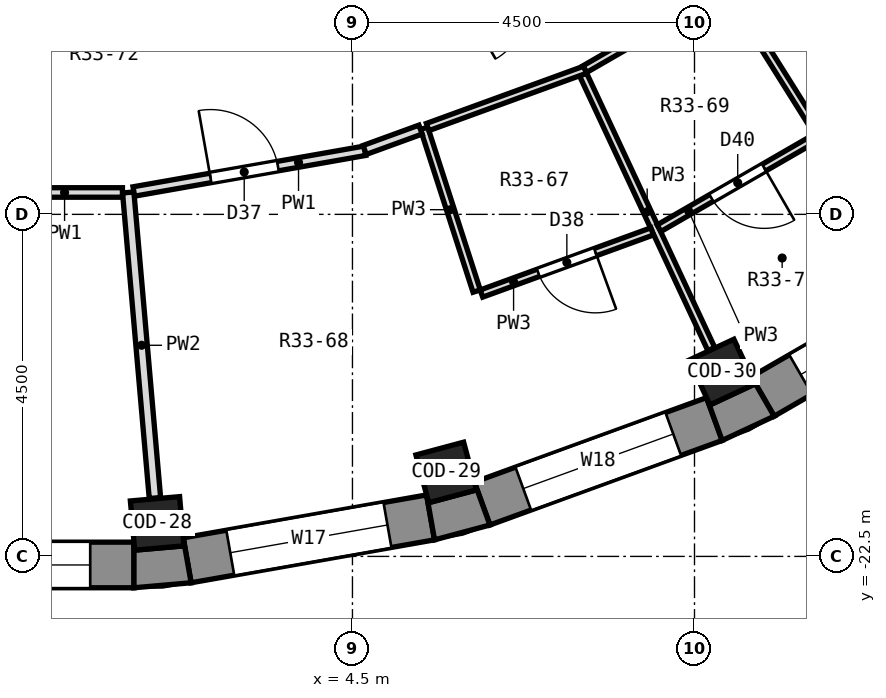
"""IFC4 building model, lengths in metres.
Left out: names, types, materials, properties, quantities, classifications, styles, units other than length and angle.
Written with IfcOpenShell. Run it as: python <this file> out.ifc"""

import sys

from ifc_helpers import new_model, si_unit, direction, frame, frame_2d, origin, origin_2d, place, context, subcontext, project, spatial, polyline, rectangle, outline, extrude, element, fill, save


model = new_model("IFC4")
c1 = context("Model", 3, precision=1e-05, world=origin(), true_north=direction((0.0, 1.0)))
c2 = subcontext(c1, "Body", "Model", "MODEL_VIEW")
j1 = project(units=[si_unit("LENGTHUNIT", "METRE"), si_unit("PLANEANGLEUNIT", "RADIAN")], contexts=[c1])
p1 = place(None, origin())
s1 = spatial("IfcSite", under=j1, at=p1, CompositionType="ELEMENT")
p2 = place(p1, origin())
s2 = spatial("IfcBuilding", under=s1, at=p2, CompositionType="ELEMENT")
p3 = place(p2, frame((0.0, 0.0, 229.7)))
s3 = spatial("IfcBuildingStorey", under=s2, at=p3, CompositionType="ELEMENT", Elevation=229.7)
for number, where, z_axis, x_axis in (
    (1, (1.93, -22.066, 0.0), (0.0, 0.0, 1.0), (0.087, -0.996, 0.0)),
    (2, (5.733, -21.395, 0.0), (0.0, 0.0, 1.0), (0.259, -0.966, 0.0)),
    (3, (9.361, -20.075, 0.0), (0.0, 0.0, 1.0), (0.423, -0.906, 0.0)),
):
    element("IfcColumn", number, at=place(p3, frame(where, z_axis=z_axis, x_axis=x_axis)), inside=s3, PredefinedType="COLUMN", context=c2, shape_type="SweptSolid", body=[
        extrude(rectangle(XDim=0.65, YDim=0.65, at=origin_2d()), origin(), (0.0, 0.0, 1.0), 3.3),
    ])
p4 = place(p3, frame((-1.626, -22.613, 0.0), z_axis=(0.0, 0.0, 1.0), x_axis=(1.0, 0.0, 0.0)))
e4 = element("IfcWall", 4, at=p4, inside=s3, PredefinedType="SOLIDWALL", context=c2, shape_type="SweptSolid", body=[
    extrude(rectangle(XDim=3.251, YDim=0.6, at=frame_2d((1.626, 0.0))), origin(), (0.0, 0.0, 1.0), 2.9),
])
p5 = place(p4, frame((0.576, 0.0, 0.9)))
e5 = element("IfcOpeningElement", 5, at=p5, cuts=e4, PredefinedType="OPENING", context=c2, shape_type="SweptSolid", body=[
    extrude(rectangle(XDim=2.1, YDim=1.8, at=frame_2d((1.05, 0.9))), frame((0.0, 0.312, 0.0), z_axis=(0.0, -1.0, 0.0), x_axis=(1.0, 0.0, 0.0)), (0.0, 0.0, 1.0), 0.624),
])
p6 = place(p3, frame((2.325, -22.551, 0.0), z_axis=(0.0, 0.0, 1.0), x_axis=(0.984806225186, 0.173656842178, 0.0)))
e6 = element("IfcWall", 6, at=p6, inside=s3, PredefinedType="SOLIDWALL", context=c2, shape_type="SweptSolid", body=[
    extrude(rectangle(XDim=3.252, YDim=0.6, at=frame_2d((1.626, 0.0))), origin(), (0.0, 0.0, 1.0), 2.9),
])
p7 = place(p6, frame((0.576, 0.0, 0.9)))
e7 = element("IfcOpeningElement", 7, at=p7, cuts=e6, PredefinedType="OPENING", context=c2, shape_type="SweptSolid", body=[
    extrude(rectangle(XDim=2.1, YDim=1.8, at=frame_2d((1.05, 0.9))), frame((0.0, 0.312, 0.0), z_axis=(0.0, -1.0, 0.0), x_axis=(1.0, 0.0, 0.0)), (0.0, 0.0, 1.0), 0.624),
])
p8 = place(p3, frame((6.206, -21.805, 0.0), z_axis=(0.0, 0.0, 1.0), x_axis=(0.939679383794, 0.342056509473, 0.0)))
e8 = element("IfcWall", 8, at=p8, inside=s3, PredefinedType="SOLIDWALL", context=c2, shape_type="SweptSolid", body=[
    extrude(rectangle(XDim=3.252, YDim=0.6, at=frame_2d((1.626, 0.0))), origin(), (0.0, 0.0, 1.0), 2.9),
])
p9 = place(p8, frame((0.576, 0.0, 0.9)))
e9 = element("IfcOpeningElement", 9, at=p9, cuts=e8, PredefinedType="OPENING", context=c2, shape_type="SweptSolid", body=[
    extrude(rectangle(XDim=2.1, YDim=1.8, at=frame_2d((1.05, 0.9))), frame((0.0, 0.312, 0.0), z_axis=(0.0, -1.0, 0.0), x_axis=(1.0, 0.0, 0.0)), (0.0, 0.0, 1.0), 0.624),
])
p10 = place(p3, frame((9.898, -20.396, 0.0), z_axis=(0.0, 0.0, 1.0), x_axis=(0.866016800201, 0.500014901547, 0.0)))
e10 = element("IfcWall", 10, at=p10, inside=s3, PredefinedType="SOLIDWALL", context=c2, shape_type="SweptSolid", body=[
    extrude(rectangle(XDim=3.252, YDim=0.6, at=frame_2d((1.626, 0.0))), origin(), (0.0, 0.0, 1.0), 2.9),
])
p11 = place(p10, frame((0.576, 0.0, 0.9)))
e11 = element("IfcOpeningElement", 11, at=p11, cuts=e10, PredefinedType="OPENING", context=c2, shape_type="SweptSolid", body=[
    extrude(rectangle(XDim=2.1, YDim=1.8, at=frame_2d((1.05, 0.9))), frame((0.0, 0.312, 0.0), z_axis=(0.0, -1.0, 0.0), x_axis=(1.0, 0.0, 0.0)), (0.0, 0.0, 1.0), 0.624),
])
p12 = place(p3, origin())
e12 = element("IfcWall", 12, at=p12, inside=s3, PredefinedType="SOLIDWALL", context=c2, shape_type="SweptSolid", body=[
    extrude(outline(polyline([(1.626, -22.913), (2.378, -22.847), (2.273, -22.256), (2.283, -22.361), (1.635, -22.418), (1.626, -22.312), (1.626, -22.913)])), origin(), (0.0, 0.0, 1.0), 2.9),
])
p13 = place(p3, origin())
e13 = element("IfcWall", 13, at=p13, inside=s3, PredefinedType="SOLIDWALL", context=c2, shape_type="SweptSolid", body=[
    extrude(outline(polyline([(6.309, -22.087), (6.104, -21.523), (6.131, -21.625), (5.503, -21.793), (5.476, -21.691), (5.58, -22.282), (6.309, -22.087)])), origin(), (0.0, 0.0, 1.0), 2.9),
])
p14 = place(p3, origin())
e14 = element("IfcWall", 14, at=p14, inside=s3, PredefinedType="SOLIDWALL", context=c2, shape_type="SweptSolid", body=[
    extrude(outline(polyline([(9.364, -20.975), (10.048, -20.656), (9.748, -20.136), (9.793, -20.232), (9.204, -20.507), (9.159, -20.411), (9.364, -20.975)])), origin(), (0.0, 0.0, 1.0), 2.9),
])
p15 = place(p3, frame((1.55, -17.712, 0.0), z_axis=(0.0, 0.0, 1.0), x_axis=(0.087120418717, -0.996197787913, 0.0)))
e15 = element("IfcWall", 15, at=p15, inside=s3, PredefinedType="PARTITIONING", context=c2, shape_type="SweptSolid", body=[
    extrude(rectangle(XDim=4.035, YDim=0.15, at=frame_2d((2.018, 0.0))), origin(), (0.0, 0.0, 1.0), 2.9),
])
p16 = place(p3, frame((5.443, -16.868, 0.0), z_axis=(0.0, 0.0, 1.0), x_axis=(0.307034478859, -0.951698391714, 0.0)))
e16 = element("IfcWall", 16, at=p16, inside=s3, PredefinedType="PARTITIONING", context=c2, shape_type="SweptSolid", body=[
    extrude(rectangle(XDim=2.25, YDim=0.1, at=frame_2d((1.125, 0.0))), origin(), (0.0, 0.0, 1.0), 2.9),
])
p17 = place(p3, frame((7.534, -16.16, 0.0), z_axis=(0.0, 0.0, 1.0), x_axis=(0.423136981181, -0.90606572342, 0.0)))
e17 = element("IfcWall", 17, at=p17, inside=s3, PredefinedType="PARTITIONING", context=c2, shape_type="SweptSolid", body=[
    extrude(rectangle(XDim=3.985, YDim=0.1, at=frame_2d((1.993, 0.0))), origin(), (0.0, 0.0, 1.0), 2.9),
])
p18 = place(p3, frame((9.423, -15.012, 0.0), z_axis=(0.0, 0.0, 1.0), x_axis=(0.531608930636, -0.846989931975, 0.0)))
e18 = element("IfcWall", 18, at=p18, inside=s3, PredefinedType="PARTITIONING", context=c2, shape_type="SweptSolid", body=[
    extrude(rectangle(XDim=2.302, YDim=0.1, at=frame_2d((1.151, 0.0))), origin(), (0.0, 0.0, 1.0), 2.9),
])
p19 = place(p3, frame((10.225, -14.607, 0.0), z_axis=(0.0, 0.0, 1.0), x_axis=(0.573696694948, -0.819067825156, 0.0)))
e19 = element("IfcWall", 19, at=p19, inside=s3, PredefinedType="PARTITIONING", context=c2, shape_type="SweptSolid", body=[
    extrude(rectangle(XDim=3.985, YDim=0.125, at=frame_2d((1.992, 0.0))), origin(), (0.0, 0.0, 1.0), 2.9),
])
p20 = place(p19, frame((2.309, 0.0, 0.0)))
e20 = element("IfcOpeningElement", 20, at=p20, cuts=e19, PredefinedType="OPENING", context=c2, shape_type="SweptSolid", body=[
    extrude(rectangle(XDim=0.9, YDim=2.1, at=frame_2d((0.45, 1.05))), frame((0.0, 0.074, 0.0), z_axis=(0.0, -1.0, 0.0), x_axis=(1.0, 0.0, 0.0)), (0.0, 0.0, 1.0), 0.149),
])
p21 = place(p3, frame((-1.488, -17.712, 0.0), z_axis=(0.0, 0.0, 1.0), x_axis=(1.0, 0.0, 0.0)))
e21 = element("IfcWall", 21, at=p21, inside=s3, PredefinedType="PARTITIONING", context=c2, shape_type="SweptSolid", body=[
    extrude(rectangle(XDim=2.962, YDim=0.125, at=frame_2d((1.481, 0.0))), origin(), (0.0, 0.0, 1.0), 2.9),
])
p22 = place(p21, frame((1.037, 0.0, 0.0)))
e22 = element("IfcOpeningElement", 22, at=p22, cuts=e21, PredefinedType="OPENING", context=c2, shape_type="SweptSolid", body=[
    extrude(rectangle(XDim=0.9, YDim=2.1, at=frame_2d((0.45, 1.05))), frame((0.0, 0.074, 0.0), z_axis=(0.0, -1.0, 0.0), x_axis=(1.0, 0.0, 0.0)), (0.0, 0.0, 1.0), 0.149),
])
p23 = place(p3, frame((1.624, -17.699, 0.0), z_axis=(0.0, 0.0, 1.0), x_axis=(0.98485035276, 0.17340640896, 0.0)))
e23 = element("IfcWall", 23, at=p23, inside=s3, PredefinedType="PARTITIONING", context=c2, shape_type="SweptSolid", body=[
    extrude(rectangle(XDim=3.088, YDim=0.125, at=frame_2d((1.544, 0.0))), origin(), (0.0, 0.0, 1.0), 2.9),
])
p24 = place(p23, frame((1.024, 0.0, 0.0)))
e24 = element("IfcOpeningElement", 24, at=p24, cuts=e23, PredefinedType="OPENING", context=c2, shape_type="SweptSolid", body=[
    extrude(rectangle(XDim=0.9, YDim=2.1, at=frame_2d((0.45, 1.05))), frame((0.0, 0.074, 0.0), z_axis=(0.0, -1.0, 0.0), x_axis=(1.0, 0.0, 0.0)), (0.0, 0.0, 1.0), 0.149),
])
p25 = place(p3, frame((6.197, -19.042, 0.0), z_axis=(0.0, 0.0, 1.0), x_axis=(0.939644231496, 0.342153062556, 0.0)))
e25 = element("IfcWall", 25, at=p25, inside=s3, PredefinedType="PARTITIONING", context=c2, shape_type="SweptSolid", body=[
    extrude(rectangle(XDim=2.39, YDim=0.1, at=frame_2d((1.195, 0.0))), origin(), (0.0, 0.0, 1.0), 2.9),
])
p26 = place(p25, frame((0.796, 0.0, 0.0)))
e26 = element("IfcOpeningElement", 26, at=p26, cuts=e25, PredefinedType="OPENING", context=c2, shape_type="SweptSolid", body=[
    extrude(rectangle(XDim=0.8, YDim=2.1, at=frame_2d((0.4, 1.05))), frame((0.0, 0.062, 0.0), z_axis=(0.0, -1.0, 0.0), x_axis=(1.0, 0.0, 0.0)), (0.0, 0.0, 1.0), 0.124),
])
p27 = place(p3, frame((5.49, -16.851, 0.0), z_axis=(0.0, 0.0, 1.0), x_axis=(0.939680214162, 0.342054228323, 0.0)))
e27 = element("IfcWall", 27, at=p27, inside=s3, PredefinedType="PARTITIONING", context=c2, shape_type="SweptSolid", body=[
    extrude(rectangle(XDim=2.205, YDim=0.1, at=frame_2d((1.103, 0.0))), origin(), (0.0, 0.0, 1.0), 2.9),
])
p28 = place(p3, frame((4.661, -17.153, 0.0), z_axis=(0.0, 0.0, 1.0), x_axis=(0.93962024549, 0.342218927391, 0.0)))
e28 = element("IfcWall", 28, at=p28, inside=s3, PredefinedType="PARTITIONING", context=c2, shape_type="SweptSolid", body=[
    extrude(rectangle(XDim=0.783, YDim=0.125, at=frame_2d((0.391, 0.0))), origin(), (0.0, 0.0, 1.0), 2.9),
])
p29 = place(p3, frame((8.533, -18.182, 0.0), z_axis=(0.0, 0.0, 1.0), x_axis=(0.866136275394, 0.49980791555, 0.0)))
e29 = element("IfcWall", 29, at=p29, inside=s3, PredefinedType="PARTITIONING", context=c2, shape_type="SweptSolid", body=[
    extrude(rectangle(XDim=2.391, YDim=0.1, at=frame_2d((1.195, 0.0))), origin(), (0.0, 0.0, 1.0), 2.9),
])
p30 = place(p29, frame((0.795, 0.0, 0.0)))
e30 = element("IfcOpeningElement", 30, at=p30, cuts=e29, PredefinedType="OPENING", context=c2, shape_type="SweptSolid", body=[
    extrude(rectangle(XDim=0.8, YDim=2.1, at=frame_2d((0.4, 1.05))), frame((0.0, 0.062, 0.0), z_axis=(0.0, -1.0, 0.0), x_axis=(1.0, 0.0, 0.0)), (0.0, 0.0, 1.0), 0.124),
])
p31 = place(p3, frame((7.557, -16.089, 0.0), z_axis=(0.0, 0.0, 1.0), x_axis=(0.866022320763, 0.500005339912, 0.0)))
e31 = element("IfcWall", 31, at=p31, inside=s3, PredefinedType="PARTITIONING", context=c2, shape_type="SweptSolid", body=[
    extrude(rectangle(XDim=2.092, YDim=0.1, at=frame_2d((1.046, 0.0))), origin(), (0.0, 0.0, 1.0), 2.9),
])
p32 = place(p5, origin())
e32 = element("IfcWindow", 32, at=p32, inside=s3, PartitioningType="SINGLE_PANEL", PredefinedType="WINDOW", context=c2, shape_type="SweptSolid", body=[
    extrude(rectangle(XDim=2.1, YDim=1.8, at=frame_2d((1.05, 0.9))), frame((0.0, 0.18, 0.0), z_axis=(0.0, -1.0, 0.0), x_axis=(1.0, 0.0, 0.0)), (0.0, 0.0, 1.0), 0.06),
])
fill(e5, e32)
p33 = place(p7, origin())
e33 = element("IfcWindow", 33, at=p33, inside=s3, PartitioningType="SINGLE_PANEL", PredefinedType="WINDOW", context=c2, shape_type="SweptSolid", body=[
    extrude(rectangle(XDim=2.1, YDim=1.8, at=frame_2d((1.05, 0.9))), frame((0.0, 0.18, 0.0), z_axis=(0.0, -1.0, 0.0), x_axis=(1.0, 0.0, 0.0)), (0.0, 0.0, 1.0), 0.06),
])
fill(e7, e33)
p34 = place(p9, origin())
e34 = element("IfcWindow", 34, at=p34, inside=s3, PartitioningType="SINGLE_PANEL", PredefinedType="WINDOW", context=c2, shape_type="SweptSolid", body=[
    extrude(rectangle(XDim=2.1, YDim=1.8, at=frame_2d((1.05, 0.9))), frame((0.0, 0.18, 0.0), z_axis=(0.0, -1.0, 0.0), x_axis=(1.0, 0.0, 0.0)), (0.0, 0.0, 1.0), 0.06),
])
fill(e9, e34)
p35 = place(p11, origin())
e35 = element("IfcWindow", 35, at=p35, inside=s3, PartitioningType="SINGLE_PANEL", PredefinedType="WINDOW", context=c2, shape_type="SweptSolid", body=[
    extrude(rectangle(XDim=2.1, YDim=1.8, at=frame_2d((1.05, 0.9))), frame((0.0, 0.18, 0.0), z_axis=(0.0, -1.0, 0.0), x_axis=(1.0, 0.0, 0.0)), (0.0, 0.0, 1.0), 0.06),
])
fill(e11, e35)
p36 = place(p24, origin())
e36 = element("IfcDoor", 36, at=p36, inside=s3, OperationType="SINGLE_SWING_LEFT", PredefinedType="DOOR", context=c2, shape_type="SweptSolid", body=[
    extrude(rectangle(XDim=0.9, YDim=2.1, at=frame_2d((0.45, 1.05))), frame((0.0, 0.025, 0.0), z_axis=(0.0, -1.0, 0.0), x_axis=(1.0, 0.0, 0.0)), (0.0, 0.0, 1.0), 0.05),
])
fill(e24, e36)
p37 = place(p26, frame((0.8, 0.0, 0.0), z_axis=(0.0, 0.0, 1.0), x_axis=(-1.0, 0.0, 0.0)))
e37 = element("IfcDoor", 37, at=p37, inside=s3, OperationType="SINGLE_SWING_LEFT", PredefinedType="DOOR", context=c2, shape_type="SweptSolid", body=[
    extrude(rectangle(XDim=0.8, YDim=2.1, at=frame_2d((0.4, 1.05))), frame((0.0, 0.025, 0.0), z_axis=(0.0, -1.0, 0.0), x_axis=(1.0, 0.0, 0.0)), (0.0, 0.0, 1.0), 0.05),
])
fill(e26, e37)
p38 = place(p30, frame((0.8, 0.0, 0.0), z_axis=(0.0, 0.0, 1.0), x_axis=(-1.0, 0.0, 0.0)))
e38 = element("IfcDoor", 38, at=p38, inside=s3, OperationType="SINGLE_SWING_LEFT", PredefinedType="DOOR", context=c2, shape_type="SweptSolid", body=[
    extrude(rectangle(XDim=0.8, YDim=2.1, at=frame_2d((0.4, 1.05))), frame((0.0, 0.025, 0.0), z_axis=(0.0, -1.0, 0.0), x_axis=(1.0, 0.0, 0.0)), (0.0, 0.0, 1.0), 0.05),
])
fill(e30, e38)
save(model, sys.argv[1])
